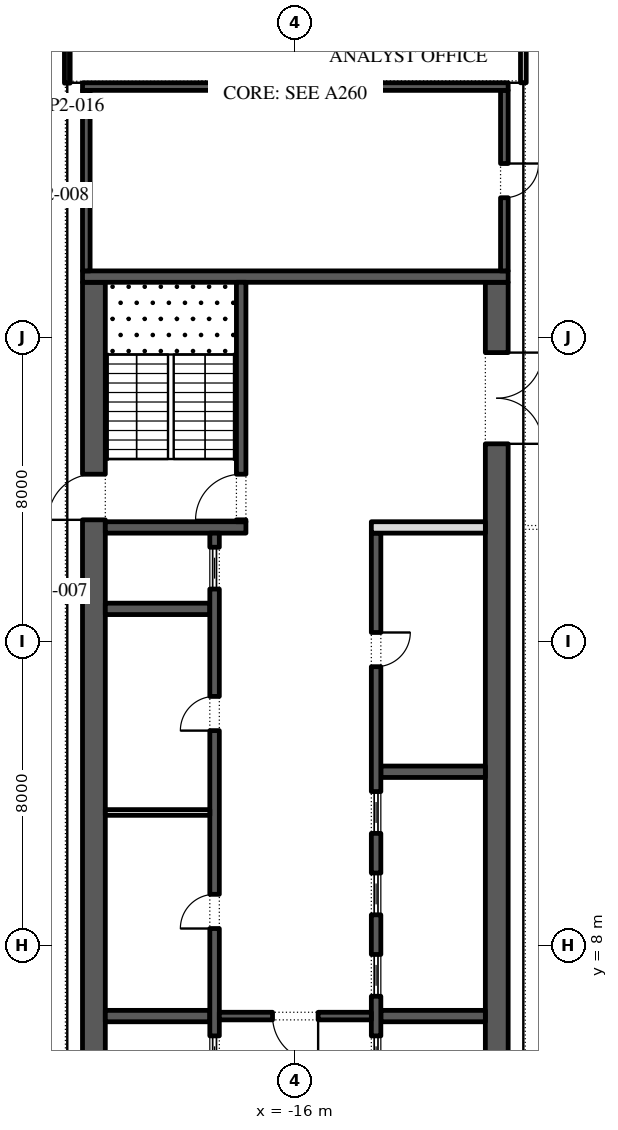
"""IFC4 building model, lengths in metres.
Left out: names, types, materials, properties, quantities, classifications, styles, units other than length and angle.
Written with IfcOpenShell. Run it as: python <this file> out.ifc"""

import sys

from ifc_helpers import new_model, si_unit, direction, frame, frame_2d, origin, place, context, subcontext, project, spatial, rectangle, extrude, element, fill, save


model = new_model("IFC4")
c1 = context("Model", 3, precision=1e-05, world=origin(), true_north=direction((0.0, 1.0)))
c2 = subcontext(c1, "Body", "Model", "MODEL_VIEW")
j1 = project(units=[si_unit("LENGTHUNIT", "METRE"), si_unit("PLANEANGLEUNIT", "RADIAN")], contexts=[c1])
p1 = place(None, origin())
s1 = spatial("IfcSite", under=j1, at=p1, CompositionType="ELEMENT")
p2 = place(p1, origin())
s2 = spatial("IfcBuilding", under=s1, at=p2, CompositionType="ELEMENT")
p3 = place(p2, frame((0.0, 0.0, 264.0)))
s3 = spatial("IfcBuildingStorey", under=s2, at=p3, CompositionType="ELEMENT", Elevation=264.0)
p4 = place(p3, frame((-21.359, 48.678, 0.0), z_axis=(0.0, 0.0, 1.0), x_axis=(-0.224949198343, -0.974370493275, 0.0)))
e1 = element("IfcWall", 1, at=p4, inside=s3, PredefinedType="STANDARD", context=c2, shape_type="SweptSolid", body=[
    extrude(rectangle(XDim=49.5, YDim=0.3, at=frame_2d((24.75, 0.0))), origin(), (0.0, 0.0, 1.0), 4.0),
])
p5 = place(p4, frame((1.157, 0.0, 0.45)))
e2 = element("IfcOpeningElement", 2, at=p5, cuts=e1, PredefinedType="OPENING", context=c2, shape_type="SweptSolid", body=[
    extrude(rectangle(XDim=4.5, YDim=3.05, at=frame_2d((2.25, 1.525))), frame((0.0, 0.16, 0.0), z_axis=(0.0, -1.0, 0.0), x_axis=(1.0, 0.0, 0.0)), (0.0, 0.0, 1.0), 0.32),
])
p6 = place(p4, frame((9.171, 0.0, 0.0)))
e3 = element("IfcOpeningElement", 3, at=p6, cuts=e1, PredefinedType="OPENING", context=c2, shape_type="SweptSolid", body=[
    extrude(rectangle(XDim=2.4, YDim=3.5, at=frame_2d((1.2, 1.75))), frame((0.0, 0.16, 0.0), z_axis=(0.0, -1.0, 0.0), x_axis=(1.0, 0.0, 0.0)), (0.0, 0.0, 1.0), 0.32),
])
p7 = place(p4, frame((15.236, 0.0, 0.45)))
e4 = element("IfcOpeningElement", 4, at=p7, cuts=e1, PredefinedType="OPENING", context=c2, shape_type="SweptSolid", body=[
    extrude(rectangle(XDim=4.5, YDim=3.05, at=frame_2d((2.25, 1.525))), frame((0.0, 0.16, 0.0), z_axis=(0.0, -1.0, 0.0), x_axis=(1.0, 0.0, 0.0)), (0.0, 0.0, 1.0), 0.32),
])
p8 = place(p4, frame((22.35, 0.0, 0.45)))
e5 = element("IfcOpeningElement", 5, at=p8, cuts=e1, PredefinedType="OPENING", context=c2, shape_type="SweptSolid", body=[
    extrude(rectangle(XDim=4.5, YDim=3.05, at=frame_2d((2.25, 1.525))), frame((0.0, 0.16, 0.0), z_axis=(0.0, -1.0, 0.0), x_axis=(1.0, 0.0, 0.0)), (0.0, 0.0, 1.0), 0.32),
])
p9 = place(p4, frame((29.464, 0.0, 0.45)))
e6 = element("IfcOpeningElement", 6, at=p9, cuts=e1, PredefinedType="OPENING", context=c2, shape_type="SweptSolid", body=[
    extrude(rectangle(XDim=4.5, YDim=3.05, at=frame_2d((2.25, 1.525))), frame((0.0, 0.16, 0.0), z_axis=(0.0, -1.0, 0.0), x_axis=(1.0, 0.0, 0.0)), (0.0, 0.0, 1.0), 0.32),
])
p10 = place(p4, frame((37.628, 0.0, 0.0)))
e7 = element("IfcOpeningElement", 7, at=p10, cuts=e1, PredefinedType="OPENING", context=c2, shape_type="SweptSolid", body=[
    extrude(rectangle(XDim=2.4, YDim=3.325, at=frame_2d((1.2, 1.663))), frame((0.0, 0.16, 0.0), z_axis=(0.0, -1.0, 0.0), x_axis=(1.0, 0.0, 0.0)), (0.0, 0.0, 1.0), 0.32),
])
p11 = place(p4, frame((43.693, 0.0, 0.45)))
e8 = element("IfcOpeningElement", 8, at=p11, cuts=e1, PredefinedType="OPENING", context=c2, shape_type="SweptSolid", body=[
    extrude(rectangle(XDim=4.5, YDim=2.825, at=frame_2d((2.25, 1.413))), frame((0.0, 0.16, 0.0), z_axis=(0.0, -1.0, 0.0), x_axis=(1.0, 0.0, 0.0)), (0.0, 0.0, 1.0), 0.32),
])
p12 = place(p3, frame((-21.3, -2.45, 0.0), z_axis=(0.0, 0.0, 1.0), x_axis=(0.0, 1.0, 0.0)))
e9 = element("IfcWall", 9, at=p12, inside=s3, PredefinedType="SHEAR", context=c2, shape_type="SweptSolid", body=[
    extrude(rectangle(XDim=27.9, YDim=0.6, at=frame_2d((13.95, 0.0))), origin(), (0.0, 0.0, 1.0), 4.0),
])
p13 = place(p12, frame((5.05, 0.0, 0.0)))
e10 = element("IfcOpeningElement", 10, at=p13, cuts=e9, PredefinedType="OPENING", context=c2, shape_type="SweptSolid", body=[
    extrude(rectangle(XDim=1.2, YDim=2.1, at=frame_2d((0.6, 1.05))), frame((0.0, 0.31, 0.0), z_axis=(0.0, -1.0, 0.0), x_axis=(1.0, 0.0, 0.0)), (0.0, 0.0, 1.0), 0.62),
])
p14 = place(p12, frame((21.65, 0.0, 0.0)))
e11 = element("IfcOpeningElement", 11, at=p14, cuts=e9, PredefinedType="OPENING", context=c2, shape_type="SweptSolid", body=[
    extrude(rectangle(XDim=1.2, YDim=2.1, at=frame_2d((0.6, 1.05))), frame((0.0, 0.31, 0.0), z_axis=(0.0, -1.0, 0.0), x_axis=(1.0, 0.0, 0.0)), (0.0, 0.0, 1.0), 0.62),
])
p15 = place(p3, frame((-10.7, -2.45, 0.0), z_axis=(0.0, 0.0, 1.0), x_axis=(0.0, 1.0, 0.0)))
e12 = element("IfcWall", 12, at=p15, inside=s3, PredefinedType="SHEAR", context=c2, shape_type="SweptSolid", body=[
    extrude(rectangle(XDim=27.9, YDim=0.6, at=frame_2d((13.95, 0.0))), origin(), (0.0, 0.0, 1.0), 4.0),
])
p16 = place(p15, frame((23.65, 0.0, 0.0)))
e13 = element("IfcOpeningElement", 13, at=p16, cuts=e12, PredefinedType="OPENING", context=c2, shape_type="SweptSolid", body=[
    extrude(rectangle(XDim=2.4, YDim=2.1, at=frame_2d((1.2, 1.05))), frame((0.0, 0.31, 0.0), z_axis=(0.0, -1.0, 0.0), x_axis=(1.0, 0.0, 0.0)), (0.0, 0.0, 1.0), 0.62),
])
p17 = place(p15, frame((0.788, 0.0, 0.0)))
e14 = element("IfcOpeningElement", 14, at=p17, cuts=e12, PredefinedType="OPENING", context=c2, shape_type="SweptSolid", body=[
    extrude(rectangle(XDim=0.9, YDim=2.1, at=frame_2d((0.45, 1.05))), frame((0.0, 0.31, 0.0), z_axis=(0.0, -1.0, 0.0), x_axis=(1.0, 0.0, 0.0)), (0.0, 0.0, 1.0), 0.62),
])
p18 = place(p15, frame((3.962, 0.0, 0.0)))
e15 = element("IfcOpeningElement", 15, at=p18, cuts=e12, PredefinedType="OPENING", context=c2, shape_type="SweptSolid", body=[
    extrude(rectangle(XDim=1.0, YDim=2.1, at=frame_2d((0.5, 1.05))), frame((0.0, 0.31, 0.0), z_axis=(0.0, -1.0, 0.0), x_axis=(1.0, 0.0, 0.0)), (0.0, 0.0, 1.0), 0.62),
])
p19 = place(p3, frame((-21.6, 25.6, 0.0), z_axis=(0.0, 0.0, 1.0), x_axis=(1.0, 0.0, 0.0)))
e16 = element("IfcWall", 16, at=p19, inside=s3, PredefinedType="SHEAR", context=c2, shape_type="SweptSolid", body=[
    extrude(rectangle(XDim=11.2, YDim=0.3, at=frame_2d((5.6, 0.0))), origin(), (0.0, 0.0, 1.0), 4.0),
])
p20 = place(p3, frame((-21.0, 19.0, 0.0), z_axis=(0.0, 0.0, 1.0), x_axis=(1.0, 0.0, 0.0)))
e17 = element("IfcWall", 17, at=p20, inside=s3, PredefinedType="SHEAR", context=c2, shape_type="SweptSolid", body=[
    extrude(rectangle(XDim=3.7, YDim=0.3, at=frame_2d((1.85, 0.0))), origin(), (0.0, 0.0, 1.0), 4.0),
])
p21 = place(p3, frame((-17.425, 19.15, 0.0), z_axis=(0.0, 0.0, 1.0), x_axis=(0.0, 1.0, 0.0)))
e18 = element("IfcWall", 18, at=p21, inside=s3, PredefinedType="SHEAR", context=c2, shape_type="SweptSolid", body=[
    extrude(rectangle(XDim=6.3, YDim=0.25, at=frame_2d((3.15, 0.0))), origin(), (0.0, 0.0, 1.0), 4.0),
])
p22 = place(p21, frame((0.05, 0.0, 0.0)))
e19 = element("IfcOpeningElement", 19, at=p22, cuts=e18, PredefinedType="OPENING", context=c2, shape_type="SweptSolid", body=[
    extrude(rectangle(XDim=1.2, YDim=2.1, at=frame_2d((0.6, 1.05))), frame((0.0, 0.135, 0.0), z_axis=(0.0, -1.0, 0.0), x_axis=(1.0, 0.0, 0.0)), (0.0, 0.0, 1.0), 0.27),
])
for number, where, z_axis, x_axis in (
    (20, (-21.0, 6.143, 0.0), (0.0, 0.0, 1.0), (1.0, 0.0, 0.0)),
    (21, (-21.0, 16.857, 0.0), (0.0, 0.0, 1.0), (1.0, 0.0, 0.0)),
):
    element("IfcWall", number, at=place(p3, frame(where, z_axis=z_axis, x_axis=x_axis)), inside=s3, PredefinedType="SHEAR", context=c2, shape_type="SweptSolid", body=[
        extrude(rectangle(XDim=2.75, YDim=0.3, at=frame_2d((1.375, 0.0))), origin(), (0.0, 0.0, 1.0), 4.0),
    ])
p23 = place(p3, frame((-18.125, 4.15, 0.0), z_axis=(0.0, 0.0, 1.0), x_axis=(0.0, 1.0, 0.0)))
e22 = element("IfcWall", 22, at=p23, inside=s3, PredefinedType="SHEAR", context=c2, shape_type="SweptSolid", body=[
    extrude(rectangle(XDim=14.7, YDim=0.25, at=frame_2d((7.35, 0.0))), origin(), (0.0, 0.0, 1.0), 4.0),
])
p24 = place(p23, frame((4.296, 0.0, 0.0)))
e23 = element("IfcOpeningElement", 23, at=p24, cuts=e22, PredefinedType="OPENING", context=c2, shape_type="SweptSolid", body=[
    extrude(rectangle(XDim=0.9, YDim=2.1, at=frame_2d((0.45, 1.05))), frame((0.0, 0.135, 0.0), z_axis=(0.0, -1.0, 0.0), x_axis=(1.0, 0.0, 0.0)), (0.0, 0.0, 1.0), 0.27),
])
p25 = place(p23, frame((9.504, 0.0, 0.0)))
e24 = element("IfcOpeningElement", 24, at=p25, cuts=e22, PredefinedType="OPENING", context=c2, shape_type="SweptSolid", body=[
    extrude(rectangle(XDim=0.9, YDim=2.1, at=frame_2d((0.45, 1.05))), frame((0.0, 0.135, 0.0), z_axis=(0.0, -1.0, 0.0), x_axis=(1.0, 0.0, 0.0)), (0.0, 0.0, 1.0), 0.27),
])
p26 = place(p23, frame((0.371, 0.0, 0.0)))
e25 = element("IfcOpeningElement", 25, at=p26, cuts=e22, PredefinedType="OPENING", context=c2, shape_type="SweptSolid", body=[
    extrude(rectangle(XDim=1.1, YDim=2.1, at=frame_2d((0.55, 1.05))), frame((0.0, 0.135, 0.0), z_axis=(0.0, -1.0, 0.0), x_axis=(1.0, 0.0, 0.0)), (0.0, 0.0, 1.0), 0.27),
])
p27 = place(p23, frame((13.229, 0.0, 0.0)))
e26 = element("IfcOpeningElement", 26, at=p27, cuts=e22, PredefinedType="OPENING", context=c2, shape_type="SweptSolid", body=[
    extrude(rectangle(XDim=1.1, YDim=2.1, at=frame_2d((0.55, 1.05))), frame((0.0, 0.135, 0.0), z_axis=(0.0, -1.0, 0.0), x_axis=(1.0, 0.0, 0.0)), (0.0, 0.0, 1.0), 0.27),
])
p28 = place(p3, frame((-21.0, 11.5, 0.0), z_axis=(0.0, 0.0, 1.0), x_axis=(1.0, 0.0, 0.0)))
e27 = element("IfcWall", 27, at=p28, inside=s3, PredefinedType="PARTITIONING", context=c2, shape_type="SweptSolid", body=[
    extrude(rectangle(XDim=2.75, YDim=0.15, at=frame_2d((1.375, 0.0))), origin(), (0.0, 0.0, 1.0), 4.0),
])
for number, where, z_axis, x_axis in (
    (28, (-13.75, 6.143, 0.0), (0.0, 0.0, 1.0), (1.0, 0.0, 0.0)),
    (29, (-13.75, 12.571, 0.0), (0.0, 0.0, 1.0), (1.0, 0.0, 0.0)),
):
    element("IfcWall", number, at=place(p3, frame(where, z_axis=z_axis, x_axis=x_axis)), inside=s3, PredefinedType="SHEAR", context=c2, shape_type="SweptSolid", body=[
        extrude(rectangle(XDim=2.75, YDim=0.3, at=frame_2d((1.375, 0.0))), origin(), (0.0, 0.0, 1.0), 4.0),
    ])
p29 = place(p3, frame((-13.875, -2.45, 0.0), z_axis=(0.0, 0.0, 1.0), x_axis=(0.0, 1.0, 0.0)))
e30 = element("IfcWall", 30, at=p29, inside=s3, PredefinedType="SHEAR", context=c2, shape_type="SweptSolid", body=[
    extrude(rectangle(XDim=21.3, YDim=0.25, at=frame_2d((10.65, 0.0))), origin(), (0.0, 0.0, 1.0), 4.0),
])
p30 = place(p29, frame((17.786, 0.0, 0.0)))
e31 = element("IfcOpeningElement", 31, at=p30, cuts=e30, PredefinedType="OPENING", context=c2, shape_type="SweptSolid", body=[
    extrude(rectangle(XDim=0.9, YDim=2.1, at=frame_2d((0.45, 1.05))), frame((0.0, 0.135, 0.0), z_axis=(0.0, -1.0, 0.0), x_axis=(1.0, 0.0, 0.0)), (0.0, 0.0, 1.0), 0.27),
])
p31 = place(p29, frame((6.971, 0.0, 0.0)))
e32 = element("IfcOpeningElement", 32, at=p31, cuts=e30, PredefinedType="OPENING", context=c2, shape_type="SweptSolid", body=[
    extrude(rectangle(XDim=1.1, YDim=2.1, at=frame_2d((0.55, 1.05))), frame((0.0, 0.135, 0.0), z_axis=(0.0, -1.0, 0.0), x_axis=(1.0, 0.0, 0.0)), (0.0, 0.0, 1.0), 0.27),
])
p32 = place(p29, frame((9.114, 0.0, 0.0)))
e33 = element("IfcOpeningElement", 33, at=p32, cuts=e30, PredefinedType="OPENING", context=c2, shape_type="SweptSolid", body=[
    extrude(rectangle(XDim=1.1, YDim=2.1, at=frame_2d((0.55, 1.05))), frame((0.0, 0.135, 0.0), z_axis=(0.0, -1.0, 0.0), x_axis=(1.0, 0.0, 0.0)), (0.0, 0.0, 1.0), 0.27),
])
p33 = place(p29, frame((11.257, 0.0, 0.0)))
e34 = element("IfcOpeningElement", 34, at=p33, cuts=e30, PredefinedType="OPENING", context=c2, shape_type="SweptSolid", body=[
    extrude(rectangle(XDim=1.1, YDim=2.1, at=frame_2d((0.55, 1.05))), frame((0.0, 0.135, 0.0), z_axis=(0.0, -1.0, 0.0), x_axis=(1.0, 0.0, 0.0)), (0.0, 0.0, 1.0), 0.27),
])
p34 = place(p29, frame((13.4, 0.0, 0.0)))
e35 = element("IfcOpeningElement", 35, at=p34, cuts=e30, PredefinedType="OPENING", context=c2, shape_type="SweptSolid", body=[
    extrude(rectangle(XDim=1.1, YDim=2.1, at=frame_2d((0.55, 1.05))), frame((0.0, 0.135, 0.0), z_axis=(0.0, -1.0, 0.0), x_axis=(1.0, 0.0, 0.0)), (0.0, 0.0, 1.0), 0.27),
])
p35 = place(p3, frame((-14.0, 19.0, 0.0), z_axis=(0.0, 0.0, 1.0), x_axis=(1.0, 0.0, 0.0)))
e36 = element("IfcWall", 36, at=p35, inside=s3, PredefinedType="PARTITIONING", context=c2, shape_type="SweptSolid", body=[
    extrude(rectangle(XDim=3.0, YDim=0.3, at=frame_2d((1.5, 0.0))), origin(), (0.0, 0.0, 1.0), 4.0),
])
p36 = place(p3, frame((-18.0, 6.143, 0.0), z_axis=(0.0, 0.0, 1.0), x_axis=(1.0, 0.0, 0.0)))
e37 = element("IfcWall", 37, at=p36, inside=s3, PredefinedType="SHEAR", context=c2, shape_type="SweptSolid", body=[
    extrude(rectangle(XDim=4.0, YDim=0.2, at=frame_2d((2.0, 0.0))), origin(), (0.0, 0.0, 1.0), 4.0),
])
p37 = place(p36, frame((1.4, 0.0, 0.0)))
e38 = element("IfcOpeningElement", 38, at=p37, cuts=e37, PredefinedType="OPENING", context=c2, shape_type="SweptSolid", body=[
    extrude(rectangle(XDim=1.2, YDim=2.1, at=frame_2d((0.6, 1.05))), frame((0.0, 0.11, 0.0), z_axis=(0.0, -1.0, 0.0), x_axis=(1.0, 0.0, 0.0)), (0.0, 0.0, 1.0), 0.22),
])
p38 = place(p3, frame((-21.5, 25.75, 0.0), z_axis=(0.0, 0.0, 1.0), x_axis=(0.0, 1.0, 0.0)))
e39 = element("IfcWall", 39, at=p38, inside=s3, PredefinedType="SHEAR", context=c2, shape_type="SweptSolid", body=[
    extrude(rectangle(XDim=4.75, YDim=0.2, at=frame_2d((2.375, 0.0))), origin(), (0.0, 0.0, 1.0), 4.0),
])
p39 = place(p3, frame((-10.5, 25.75, 0.0), z_axis=(0.0, 0.0, 1.0), x_axis=(0.0, 1.0, 0.0)))
e40 = element("IfcWall", 40, at=p39, inside=s3, PredefinedType="SHEAR", context=c2, shape_type="SweptSolid", body=[
    extrude(rectangle(XDim=4.75, YDim=0.2, at=frame_2d((2.375, 0.0))), origin(), (0.0, 0.0, 1.0), 4.0),
])
p40 = place(p39, frame((1.925, 0.0, 0.0)))
e41 = element("IfcOpeningElement", 41, at=p40, cuts=e40, PredefinedType="OPENING", context=c2, shape_type="SweptSolid", body=[
    extrude(rectangle(XDim=0.9, YDim=2.1, at=frame_2d((0.45, 1.05))), frame((0.0, 0.11, 0.0), z_axis=(0.0, -1.0, 0.0), x_axis=(1.0, 0.0, 0.0)), (0.0, 0.0, 1.0), 0.22),
])
p41 = place(p3, frame((-21.6, 30.6, 0.0), z_axis=(0.0, 0.0, 1.0), x_axis=(1.0, 0.0, 0.0)))
e42 = element("IfcWall", 42, at=p41, inside=s3, PredefinedType="SHEAR", context=c2, shape_type="SweptSolid", body=[
    extrude(rectangle(XDim=11.2, YDim=0.2, at=frame_2d((5.6, 0.0))), origin(), (0.0, 0.0, 1.0), 4.0),
])
p42 = place(p3, frame((-22.0, 32.7, 0.0), z_axis=(0.0, 0.0, 1.0), x_axis=(0.0, -1.0, 0.0)))
e43 = element("IfcWall", 43, at=p42, inside=s3, PredefinedType="PARTITIONING", context=c2, shape_type="SweptSolid", body=[
    extrude(rectangle(XDim=2.01, YDim=0.15, at=frame_2d((1.005, 0.0))), origin(), (0.0, 0.0, 1.0), 4.0),
])
p43 = place(p3, frame((-10.0, 30.7, 0.0), z_axis=(0.0, 0.0, 1.0), x_axis=(0.0, 1.0, 0.0)))
e44 = element("IfcWall", 44, at=p43, inside=s3, PredefinedType="PARTITIONING", context=c2, shape_type="SweptSolid", body=[
    extrude(rectangle(XDim=2.0, YDim=0.15, at=frame_2d((1.0, 0.0))), origin(), (0.0, 0.0, 1.0), 4.0),
])
p44 = place(p24, origin())
e45 = element("IfcDoor", 45, at=p44, inside=s3, OperationType="SINGLE_SWING_RIGHT", PredefinedType="DOOR", context=c2, shape_type="SweptSolid", body=[
    extrude(rectangle(XDim=0.9, YDim=2.1, at=frame_2d((0.45, 1.05))), frame((0.0, 0.125, 0.0), z_axis=(0.0, -1.0, 0.0), x_axis=(1.0, 0.0, 0.0)), (0.0, 0.0, 1.0), 0.05),
])
fill(e23, e45)
p45 = place(p25, origin())
e46 = element("IfcDoor", 46, at=p45, inside=s3, OperationType="SINGLE_SWING_RIGHT", PredefinedType="DOOR", context=c2, shape_type="SweptSolid", body=[
    extrude(rectangle(XDim=0.9, YDim=2.1, at=frame_2d((0.45, 1.05))), frame((0.0, 0.125, 0.0), z_axis=(0.0, -1.0, 0.0), x_axis=(1.0, 0.0, 0.0)), (0.0, 0.0, 1.0), 0.05),
])
fill(e24, e46)
p46 = place(p26, origin())
e47 = element("IfcDoor", 47, at=p46, inside=s3, OperationType="SLIDING_TO_LEFT", PredefinedType="DOOR", context=c2, shape_type="SweptSolid", body=[
    extrude(rectangle(XDim=1.1, YDim=2.1, at=frame_2d((0.55, 1.05))), frame((0.0, 0.025, 0.0), z_axis=(0.0, -1.0, 0.0), x_axis=(1.0, 0.0, 0.0)), (0.0, 0.0, 1.0), 0.05),
])
fill(e25, e47)
p47 = place(p27, origin())
e48 = element("IfcDoor", 48, at=p47, inside=s3, OperationType="SLIDING_TO_LEFT", PredefinedType="DOOR", context=c2, shape_type="SweptSolid", body=[
    extrude(rectangle(XDim=1.1, YDim=2.1, at=frame_2d((0.55, 1.05))), frame((0.0, 0.025, 0.0), z_axis=(0.0, -1.0, 0.0), x_axis=(1.0, 0.0, 0.0)), (0.0, 0.0, 1.0), 0.05),
])
fill(e26, e48)
p48 = place(p30, frame((0.9, -0.2, 0.0), z_axis=(0.0, 0.0, 1.0), x_axis=(-1.0, 0.0, 0.0)))
e49 = element("IfcDoor", 49, at=p48, inside=s3, OperationType="SINGLE_SWING_RIGHT", PredefinedType="DOOR", context=c2, shape_type="SweptSolid", body=[
    extrude(rectangle(XDim=0.9, YDim=2.1, at=frame_2d((0.45, 1.05))), frame((0.0, -0.075, 0.0), z_axis=(0.0, -1.0, 0.0), x_axis=(1.0, 0.0, 0.0)), (0.0, 0.0, 1.0), 0.05),
])
fill(e31, e49)
p49 = place(p31, origin())
e50 = element("IfcDoor", 50, at=p49, inside=s3, OperationType="SLIDING_TO_LEFT", PredefinedType="DOOR", context=c2, shape_type="SweptSolid", body=[
    extrude(rectangle(XDim=1.1, YDim=2.1, at=frame_2d((0.55, 1.05))), frame((0.0, 0.025, 0.0), z_axis=(0.0, -1.0, 0.0), x_axis=(1.0, 0.0, 0.0)), (0.0, 0.0, 1.0), 0.05),
])
fill(e32, e50)
p50 = place(p32, origin())
e51 = element("IfcDoor", 51, at=p50, inside=s3, OperationType="SLIDING_TO_LEFT", PredefinedType="DOOR", context=c2, shape_type="SweptSolid", body=[
    extrude(rectangle(XDim=1.1, YDim=2.1, at=frame_2d((0.55, 1.05))), frame((0.0, 0.025, 0.0), z_axis=(0.0, -1.0, 0.0), x_axis=(1.0, 0.0, 0.0)), (0.0, 0.0, 1.0), 0.05),
])
fill(e33, e51)
p51 = place(p33, origin())
e52 = element("IfcDoor", 52, at=p51, inside=s3, OperationType="SLIDING_TO_LEFT", PredefinedType="DOOR", context=c2, shape_type="SweptSolid", body=[
    extrude(rectangle(XDim=1.1, YDim=2.1, at=frame_2d((0.55, 1.05))), frame((0.0, 0.025, 0.0), z_axis=(0.0, -1.0, 0.0), x_axis=(1.0, 0.0, 0.0)), (0.0, 0.0, 1.0), 0.05),
])
fill(e34, e52)
p52 = place(p34, origin())
e53 = element("IfcDoor", 53, at=p52, inside=s3, OperationType="SLIDING_TO_LEFT", PredefinedType="DOOR", context=c2, shape_type="SweptSolid", body=[
    extrude(rectangle(XDim=1.1, YDim=2.1, at=frame_2d((0.55, 1.05))), frame((0.0, 0.025, 0.0), z_axis=(0.0, -1.0, 0.0), x_axis=(1.0, 0.0, 0.0)), (0.0, 0.0, 1.0), 0.05),
])
fill(e35, e53)
p53 = place(p37, frame((1.2, 0.0, 0.0), z_axis=(0.0, 0.0, 1.0), x_axis=(-1.0, 0.0, 0.0)))
e54 = element("IfcDoor", 54, at=p53, inside=s3, OperationType="SINGLE_SWING_RIGHT", PredefinedType="DOOR", context=c2, shape_type="SweptSolid", body=[
    extrude(rectangle(XDim=1.2, YDim=2.1, at=frame_2d((0.6, 1.05))), frame((0.0, 0.025, 0.0), z_axis=(0.0, -1.0, 0.0), x_axis=(1.0, 0.0, 0.0)), (0.0, 0.0, 1.0), 0.05),
])
fill(e38, e54)
p54 = place(p16, frame((2.4, 0.0, 0.0), z_axis=(0.0, 0.0, 1.0), x_axis=(-1.0, 0.0, 0.0)))
e55 = element("IfcDoor", 55, at=p54, inside=s3, OperationType="DOUBLE_DOOR_SINGLE_SWING", PredefinedType="DOOR", context=c2, shape_type="SweptSolid", body=[
    extrude(rectangle(XDim=2.4, YDim=2.1, at=frame_2d((1.2, 1.05))), frame((0.0, 0.025, 0.0), z_axis=(0.0, -1.0, 0.0), x_axis=(1.0, 0.0, 0.0)), (0.0, 0.0, 1.0), 0.05),
])
fill(e13, e55)
p55 = place(p22, origin())
e56 = element("IfcDoor", 56, at=p55, inside=s3, OperationType="SINGLE_SWING_RIGHT", PredefinedType="DOOR", context=c2, shape_type="SweptSolid", body=[
    extrude(rectangle(XDim=1.2, YDim=2.1, at=frame_2d((0.6, 1.05))), frame((0.0, 0.025, 0.0), z_axis=(0.0, -1.0, 0.0), x_axis=(1.0, 0.0, 0.0)), (0.0, 0.0, 1.0), 0.05),
])
fill(e19, e56)
p56 = place(p14, origin())
e57 = element("IfcDoor", 57, at=p56, inside=s3, OperationType="SINGLE_SWING_RIGHT", PredefinedType="DOOR", context=c2, shape_type="SweptSolid", body=[
    extrude(rectangle(XDim=1.2, YDim=2.1, at=frame_2d((0.6, 1.05))), frame((0.0, 0.025, 0.0), z_axis=(0.0, -1.0, 0.0), x_axis=(1.0, 0.0, 0.0)), (0.0, 0.0, 1.0), 0.05),
])
fill(e11, e57)
p57 = place(p40, frame((0.9, 0.15, 0.0), z_axis=(0.0, 0.0, 1.0), x_axis=(-1.0, 0.0, 0.0)))
e58 = element("IfcDoor", 58, at=p57, inside=s3, OperationType="SINGLE_SWING_RIGHT", PredefinedType="DOOR", context=c2, shape_type="SweptSolid", body=[
    extrude(rectangle(XDim=0.9, YDim=2.1, at=frame_2d((0.45, 1.05))), frame((0.0, 0.1, 0.0), z_axis=(0.0, -1.0, 0.0), x_axis=(1.0, 0.0, 0.0)), (0.0, 0.0, 1.0), 0.05),
])
fill(e41, e58)
save(model, sys.argv[1])
